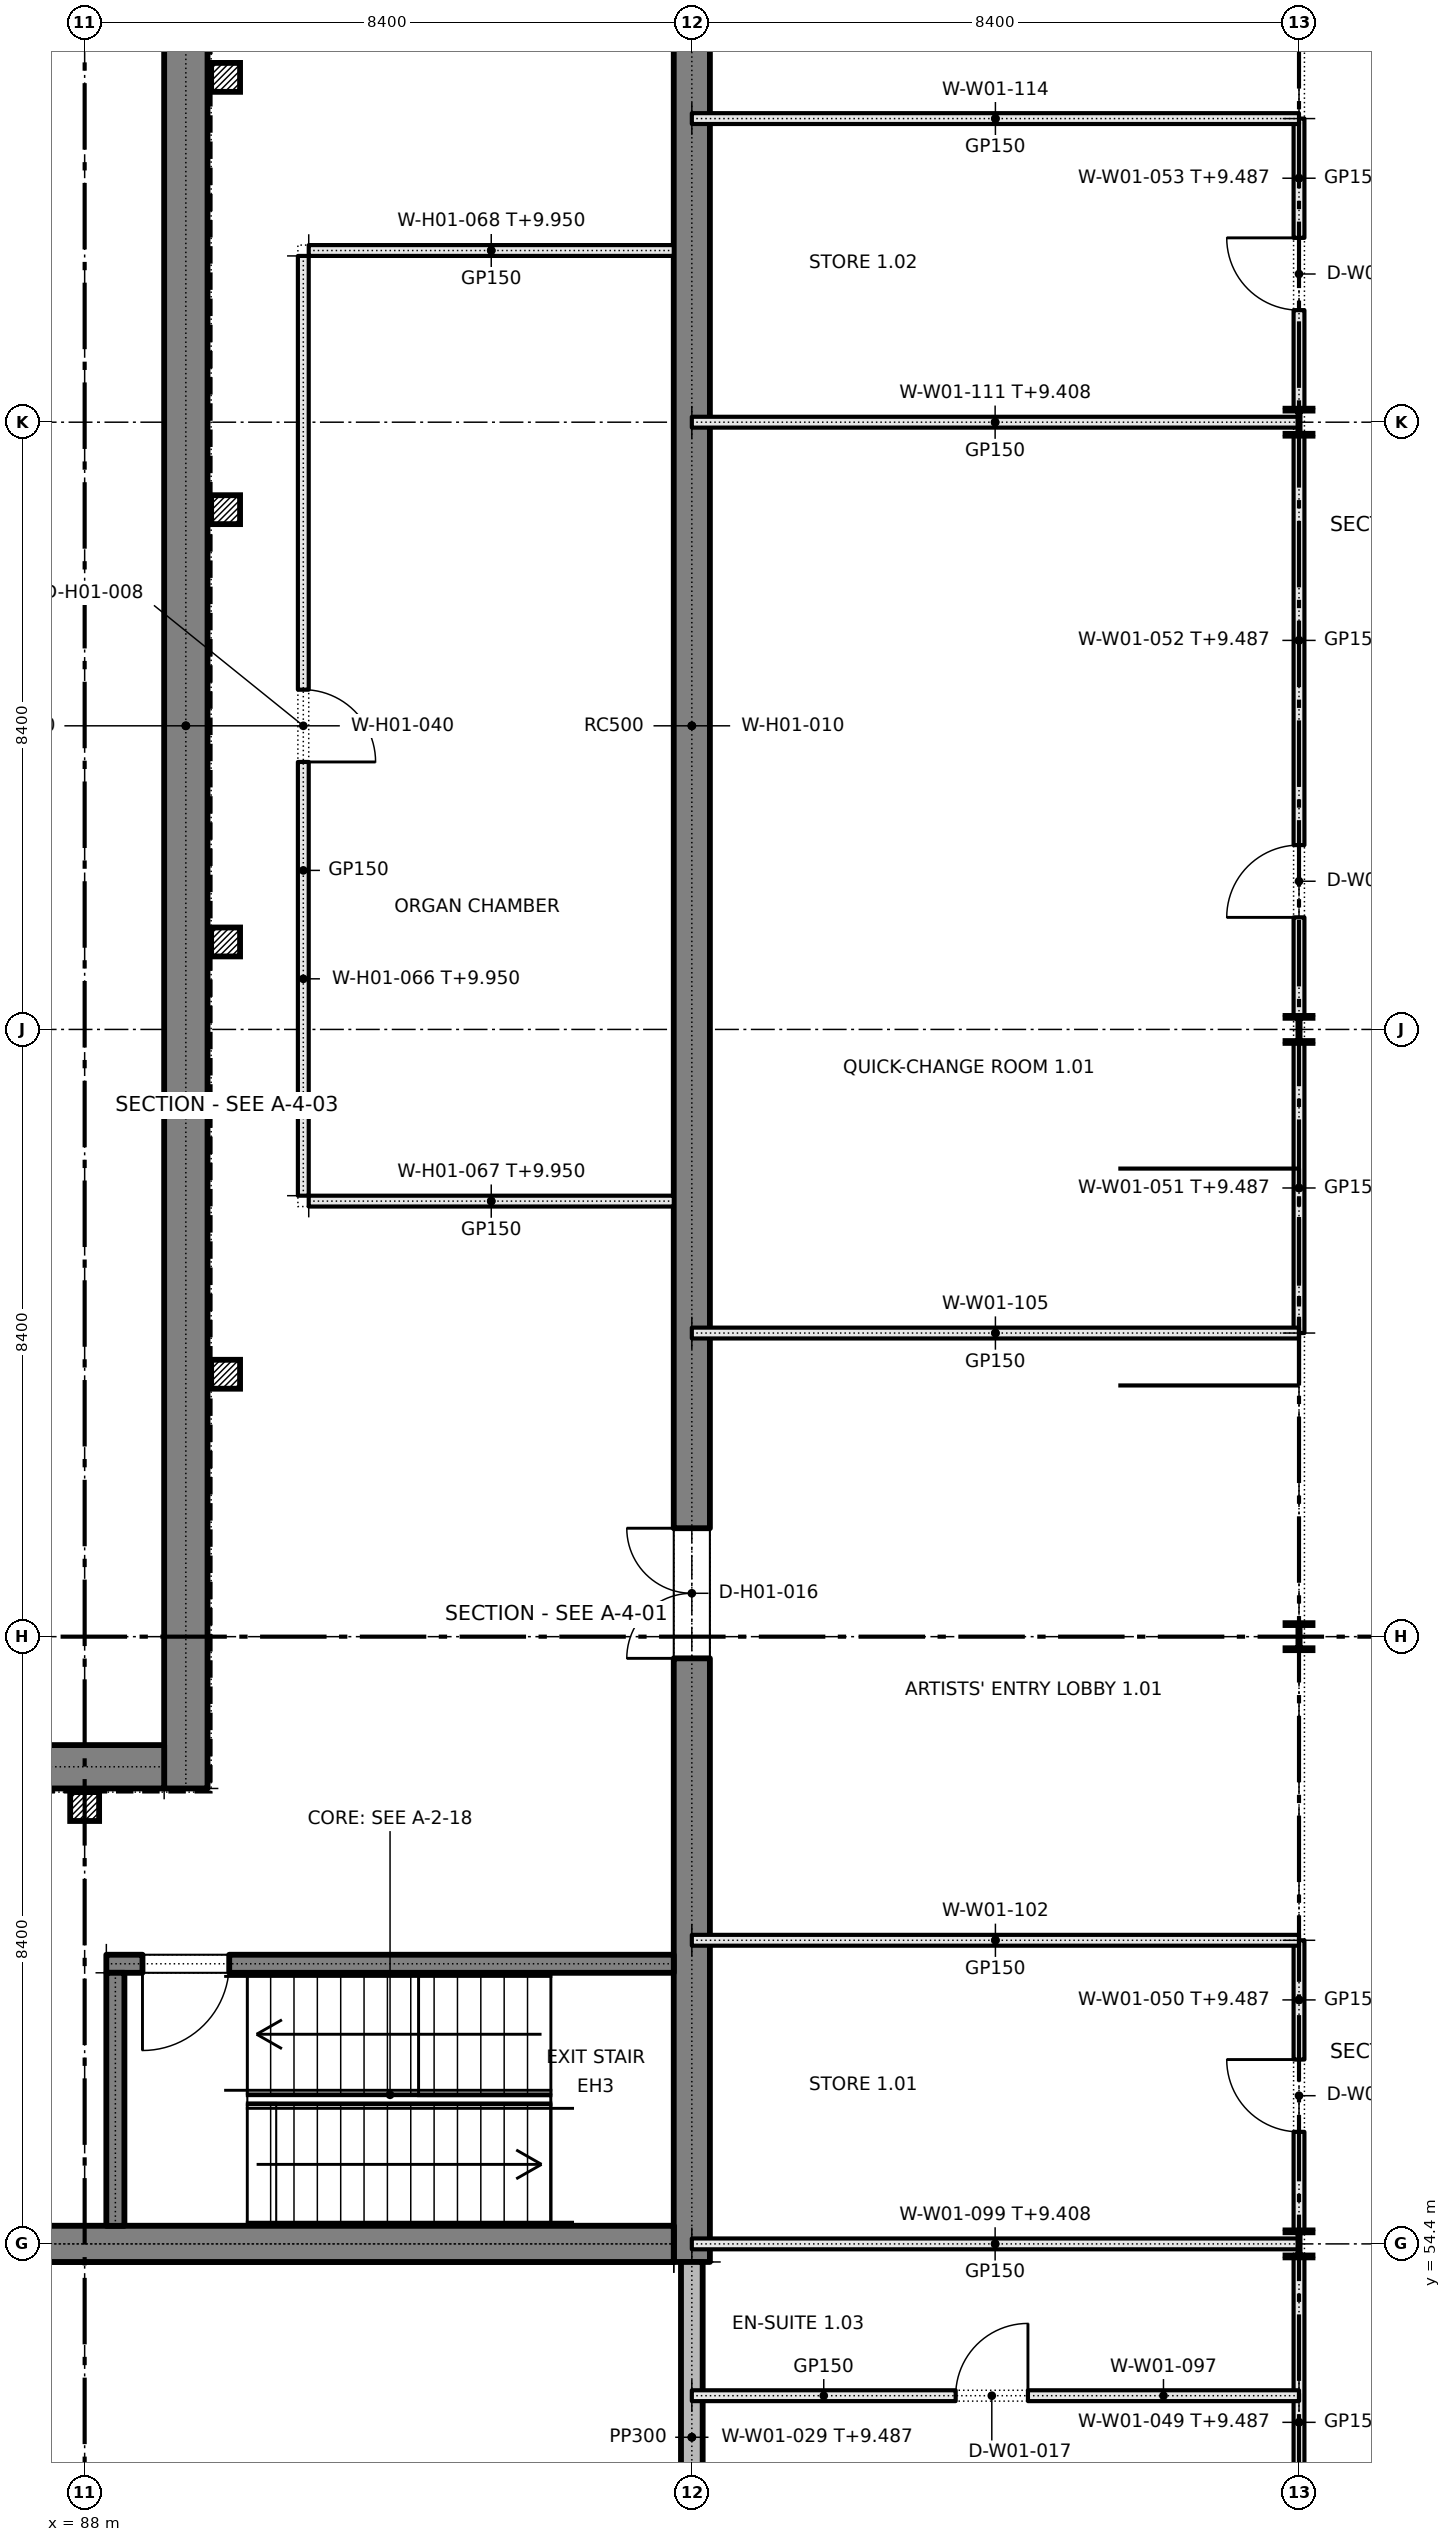
"""IFC4 building model, lengths in metres.
Left out: names, types, materials, properties, quantities, classifications, styles, units other than length and angle.
Written with IfcOpenShell. Run it as: python <this file> out.ifc"""

import sys

from ifc_helpers import new_model, si_unit, direction, frame, frame_2d, origin, origin_2d, place, context, subcontext, project, spatial, rectangle, i_section, extrude, element, fill, save


model = new_model("IFC4")
c1 = context("Model", 3, precision=1e-05, world=origin(), true_north=direction((0.0, 1.0)))
c2 = subcontext(c1, "Body", "Model", "MODEL_VIEW")
j1 = project(units=[si_unit("LENGTHUNIT", "METRE"), si_unit("PLANEANGLEUNIT", "RADIAN")], contexts=[c1])
p1 = place(None, origin())
s1 = spatial("IfcSite", under=j1, at=p1, CompositionType="ELEMENT")
p2 = place(p1, origin())
s2 = spatial("IfcBuilding", under=s1, at=p2, CompositionType="ELEMENT")
p3 = place(p2, frame((0.0, 0.0, 5.4)))
s3 = spatial("IfcBuildingStorey", under=s2, at=p3, CompositionType="ELEMENT", Elevation=5.4)
p4 = place(p3, frame((96.4, 54.15, 0.0), z_axis=(0.0, 0.0, 1.0), x_axis=(0.0, 1.0, 0.0)))
e1 = element("IfcWall", 1, at=p4, inside=s3, PredefinedType="SOLIDWALL", context=c2, shape_type="SweptSolid", body=[
    extrude(rectangle(XDim=42.5, YDim=0.5, at=frame_2d((21.25, 0.0))), origin(), (0.0, 0.0, 1.0), 4.8),
])
p5 = place(p4, frame((8.35, 0.0, 0.0)))
e2 = element("IfcOpeningElement", 2, at=p5, cuts=e1, PredefinedType="OPENING", context=c2, shape_type="SweptSolid", body=[
    extrude(rectangle(XDim=1.8, YDim=2.1, at=frame_2d((0.9, 1.05))), frame((0.0, 0.26, 0.0), z_axis=(0.0, -1.0, 0.0), x_axis=(1.0, 0.0, 0.0)), (0.0, 0.0, 1.0), 0.52),
])
p6 = place(p4, frame((32.35, 0.0, 0.0)))
e3 = element("IfcOpeningElement", 3, at=p6, cuts=e1, PredefinedType="OPENING", context=c2, shape_type="SweptSolid", body=[
    extrude(rectangle(XDim=1.8, YDim=2.1, at=frame_2d((0.9, 1.05))), frame((0.0, 0.26, 0.0), z_axis=(0.0, -1.0, 0.0), x_axis=(1.0, 0.0, 0.0)), (0.0, 0.0, 1.0), 0.52),
])
p7 = place(p3, frame((85.9, 54.4, 0.0), z_axis=(0.0, 0.0, 1.0), x_axis=(1.0, 0.0, 0.0)))
e4 = element("IfcWall", 4, at=p7, inside=s3, PredefinedType="SOLIDWALL", context=c2, shape_type="SweptSolid", body=[
    extrude(rectangle(XDim=10.25, YDim=0.5, at=frame_2d((5.125, 0.0))), origin(), (0.0, 0.0, 1.0), 3.5),
])
p8 = place(p3, frame((29.45, 54.4, 3.5), z_axis=(0.0, 0.0, 1.0), x_axis=(1.0, 0.0, 0.0)))
e5 = element("IfcWall", 5, at=p8, inside=s3, PredefinedType="SOLIDWALL", context=c2, shape_type="SweptSolid", body=[
    extrude(rectangle(XDim=66.7, YDim=0.5, at=frame_2d((33.35, 0.0))), origin(), (0.0, 0.0, 1.0), 1.3),
])
p9 = place(p3, frame((89.4, 60.7, 0.0), z_axis=(0.0, 0.0, 1.0), x_axis=(0.0, 1.0, 0.0)))
e6 = element("IfcWall", 6, at=p9, inside=s3, PredefinedType="SOLIDWALL", context=c2, shape_type="SweptSolid", body=[
    extrude(rectangle(XDim=29.4, YDim=0.6, at=frame_2d((14.7, 0.0))), origin(), (0.0, 0.0, 1.0), 4.8),
])
p10 = place(p3, frame((36.5, 61.0, 0.0), z_axis=(0.0, 0.0, 1.0), x_axis=(1.0, 0.0, 0.0)))
e7 = element("IfcWall", 7, at=p10, inside=s3, PredefinedType="SOLIDWALL", context=c2, shape_type="SweptSolid", body=[
    extrude(rectangle(XDim=52.6, YDim=0.6, at=frame_2d((26.3, 0.0))), origin(), (0.0, 0.0, 1.0), 4.8),
])
p11 = place(p10, frame((9.9, 0.0, 0.0)))
e8 = element("IfcOpeningElement", 8, at=p11, cuts=e7, PredefinedType="OPENING", context=c2, shape_type="SweptSolid", body=[
    extrude(rectangle(XDim=1.2, YDim=2.1, at=frame_2d((0.6, 1.05))), frame((0.0, 0.31, 0.0), z_axis=(0.0, -1.0, 0.0), x_axis=(1.0, 0.0, 0.0)), (0.0, 0.0, 1.0), 0.62),
])
p12 = place(p10, frame((15.4, 0.0, 0.0)))
e9 = element("IfcOpeningElement", 9, at=p12, cuts=e7, PredefinedType="OPENING", context=c2, shape_type="SweptSolid", body=[
    extrude(rectangle(XDim=1.2, YDim=2.1, at=frame_2d((0.6, 1.05))), frame((0.0, 0.31, 0.0), z_axis=(0.0, -1.0, 0.0), x_axis=(1.0, 0.0, 0.0)), (0.0, 0.0, 1.0), 0.62),
])
p13 = place(p10, frame((32.4, 0.0, 0.0)))
e10 = element("IfcOpeningElement", 10, at=p13, cuts=e7, PredefinedType="OPENING", context=c2, shape_type="SweptSolid", body=[
    extrude(rectangle(XDim=1.2, YDim=2.1, at=frame_2d((0.6, 1.05))), frame((0.0, 0.31, 0.0), z_axis=(0.0, -1.0, 0.0), x_axis=(1.0, 0.0, 0.0)), (0.0, 0.0, 1.0), 0.62),
])
p14 = place(p3, frame((88.3, 58.275, 0.0), z_axis=(0.0, 0.0, 1.0), x_axis=(1.0, 0.0, 0.0)))
e11 = element("IfcWall", 11, at=p14, inside=s3, PredefinedType="SOLIDWALL", context=c2, shape_type="SweptSolid", body=[
    extrude(rectangle(XDim=7.85, YDim=0.25, at=frame_2d((3.925, 0.0))), origin(), (0.0, 0.0, 1.0), 4.8),
])
p15 = place(p14, frame((0.5, 0.0, 0.0)))
e12 = element("IfcOpeningElement", 12, at=p15, cuts=e11, PredefinedType="OPENING", context=c2, shape_type="SweptSolid", body=[
    extrude(rectangle(XDim=1.2, YDim=2.1, at=frame_2d((0.6, 1.05))), frame((0.0, 0.135, 0.0), z_axis=(0.0, -1.0, 0.0), x_axis=(1.0, 0.0, 0.0)), (0.0, 0.0, 1.0), 0.27),
])
p16 = place(p3, frame((88.425, 54.65, 0.0), z_axis=(0.0, 0.0, 1.0), x_axis=(0.0, 1.0, 0.0)))
e13 = element("IfcWall", 13, at=p16, inside=s3, PredefinedType="SOLIDWALL", context=c2, shape_type="SweptSolid", body=[
    extrude(rectangle(XDim=3.5, YDim=0.25, at=frame_2d((1.75, 0.0))), origin(), (0.0, 0.0, 1.0), 4.8),
])
for number, where, z_axis, x_axis in (
    (14, (88.0, 60.45, 0.0), (0.0, 0.0, 1.0), (1.0, 0.0, 0.0)),
    (15, (89.95, 66.43, 0.0), (0.0, 0.0, 1.0), (1.0, 0.0, 0.0)),
    (16, (89.95, 72.41, 0.0), (0.0, 0.0, 1.0), (1.0, 0.0, 0.0)),
    (17, (89.95, 78.39, 0.0), (0.0, 0.0, 1.0), (1.0, 0.0, 0.0)),
    (18, (89.95, 84.37, 0.0), (0.0, 0.0, 1.0), (1.0, 0.0, 0.0)),
):
    element("IfcColumn", number, at=place(p3, frame(where, z_axis=z_axis, x_axis=x_axis)), inside=s3, PredefinedType="COLUMN", context=c2, shape_type="SweptSolid", body=[
        extrude(rectangle(XDim=0.4, YDim=0.4, at=origin_2d()), origin(), (0.0, 0.0, 1.0), 4.8),
    ])
for number, where, z_axis, x_axis in (
    (19, (104.8, 54.4, 0.0), (0.0, 0.0, 1.0), (1.0, 0.0, 0.0)),
    (20, (104.8, 62.8, 0.0), (0.0, 0.0, 1.0), (1.0, 0.0, 0.0)),
    (21, (104.8, 71.2, 0.0), (0.0, 0.0, 1.0), (1.0, 0.0, 0.0)),
    (22, (104.8, 79.6, 0.0), (0.0, 0.0, 1.0), (1.0, 0.0, 0.0)),
):
    element("IfcColumn", number, at=place(p3, frame(where, z_axis=z_axis, x_axis=x_axis)), inside=s3, PredefinedType="COLUMN", context=c2, shape_type="SweptSolid", body=[
        extrude(i_section(OverallWidth=0.373, OverallDepth=0.373, WebThickness=0.016, FlangeThickness=0.026, FilletRadius=0.015, at=origin_2d()), origin(), (0.0, 0.0, 1.0), 4.8),
    ])
p17 = place(p3, frame((96.4, 46.187, 0.0), z_axis=(0.0, 0.0, 1.0), x_axis=(0.0, 1.0, 0.0)))
e23 = element("IfcWall", 23, at=p17, inside=s3, PredefinedType="SOLIDWALL", context=c2, shape_type="SweptSolid", body=[
    extrude(rectangle(XDim=7.963, YDim=0.3, at=frame_2d((3.981, 0.0))), origin(), (0.0, 0.0, 1.0), 4.087),
])
p18 = place(p17, frame((0.713, 0.0, 0.95)))
e24 = element("IfcOpeningElement", 24, at=p18, cuts=e23, PredefinedType="OPENING", context=c2, shape_type="SweptSolid", body=[
    extrude(rectangle(XDim=2.4, YDim=1.8, at=frame_2d((1.2, 0.9))), frame((0.0, 0.16, 0.0), z_axis=(0.0, -1.0, 0.0), x_axis=(1.0, 0.0, 0.0)), (0.0, 0.0, 1.0), 0.32),
])
p19 = place(p3, frame((91.025, 68.9, 0.0), z_axis=(0.0, 0.0, 1.0), x_axis=(0.0, 1.0, 0.0)))
e25 = element("IfcWall", 25, at=p19, inside=s3, PredefinedType="PARTITIONING", context=c2, shape_type="SweptSolid", body=[
    extrude(rectangle(XDim=13.0, YDim=0.15, at=frame_2d((6.5, 0.0))), origin(), (0.0, 0.0, 1.0), 4.55),
])
p20 = place(p19, frame((6.0, 0.0, 0.0)))
e26 = element("IfcOpeningElement", 26, at=p20, cuts=e25, PredefinedType="OPENING", context=c2, shape_type="SweptSolid", body=[
    extrude(rectangle(XDim=1.0, YDim=2.1, at=frame_2d((0.5, 1.05))), frame((0.0, 0.085, 0.0), z_axis=(0.0, -1.0, 0.0), x_axis=(1.0, 0.0, 0.0)), (0.0, 0.0, 1.0), 0.17),
])
for number, where, z_axis, x_axis in (
    (27, (91.1, 68.825, 0.0), (0.0, 0.0, 1.0), (1.0, 0.0, 0.0)),
    (28, (91.1, 81.975, 0.0), (0.0, 0.0, 1.0), (1.0, 0.0, 0.0)),
):
    element("IfcWall", number, at=place(p3, frame(where, z_axis=z_axis, x_axis=x_axis)), inside=s3, PredefinedType="PARTITIONING", context=c2, shape_type="SweptSolid", body=[
        extrude(rectangle(XDim=5.05, YDim=0.15, at=frame_2d((2.525, 0.0))), origin(), (0.0, 0.0, 1.0), 4.55),
    ])
p21 = place(p3, frame((104.8, 46.187, 0.0), z_axis=(0.0, 0.0, 1.0), x_axis=(0.0, 1.0, 0.0)))
e29 = element("IfcWall", 29, at=p21, inside=s3, PredefinedType="PARTITIONING", context=c2, shape_type="SweptSolid", body=[
    extrude(rectangle(XDim=8.027, YDim=0.15, at=frame_2d((4.013, 0.0))), origin(), (0.0, 0.0, 1.0), 4.087),
])
p22 = place(p21, frame((2.463, 0.0, 0.0)))
e30 = element("IfcOpeningElement", 30, at=p22, cuts=e29, PredefinedType="OPENING", context=c2, shape_type="SweptSolid", body=[
    extrude(rectangle(XDim=1.0, YDim=2.1, at=frame_2d((0.5, 1.05))), frame((0.0, 0.085, 0.0), z_axis=(0.0, -1.0, 0.0), x_axis=(1.0, 0.0, 0.0)), (0.0, 0.0, 1.0), 0.17),
])
p23 = place(p3, frame((104.8, 54.587, 0.0), z_axis=(0.0, 0.0, 1.0), x_axis=(0.0, 1.0, 0.0)))
e31 = element("IfcWall", 31, at=p23, inside=s3, PredefinedType="PARTITIONING", context=c2, shape_type="SweptSolid", body=[
    extrude(rectangle(XDim=4.013, YDim=0.15, at=frame_2d((2.007, 0.0))), origin(), (0.0, 0.0, 1.0), 4.087),
])
p24 = place(p23, frame((1.363, 0.0, 0.0)))
e32 = element("IfcOpeningElement", 32, at=p24, cuts=e31, PredefinedType="OPENING", context=c2, shape_type="SweptSolid", body=[
    extrude(rectangle(XDim=1.0, YDim=2.1, at=frame_2d((0.5, 1.05))), frame((0.0, 0.085, 0.0), z_axis=(0.0, -1.0, 0.0), x_axis=(1.0, 0.0, 0.0)), (0.0, 0.0, 1.0), 0.17),
])
p25 = place(p3, frame((104.8, 67.0, 0.0), z_axis=(0.0, 0.0, 1.0), x_axis=(0.0, 1.0, 0.0)))
e33 = element("IfcWall", 33, at=p25, inside=s3, PredefinedType="PARTITIONING", context=c2, shape_type="SweptSolid", body=[
    extrude(rectangle(XDim=4.013, YDim=0.15, at=frame_2d((2.007, 0.0))), origin(), (0.0, 0.0, 1.0), 4.087),
])
p26 = place(p3, frame((104.8, 71.387, 0.0), z_axis=(0.0, 0.0, 1.0), x_axis=(0.0, 1.0, 0.0)))
e34 = element("IfcWall", 34, at=p26, inside=s3, PredefinedType="PARTITIONING", context=c2, shape_type="SweptSolid", body=[
    extrude(rectangle(XDim=8.027, YDim=0.15, at=frame_2d((4.013, 0.0))), origin(), (0.0, 0.0, 1.0), 4.087),
])
p27 = place(p26, frame((1.363, 0.0, 0.0)))
e35 = element("IfcOpeningElement", 35, at=p27, cuts=e34, PredefinedType="OPENING", context=c2, shape_type="SweptSolid", body=[
    extrude(rectangle(XDim=1.0, YDim=2.1, at=frame_2d((0.5, 1.05))), frame((0.0, 0.085, 0.0), z_axis=(0.0, -1.0, 0.0), x_axis=(1.0, 0.0, 0.0)), (0.0, 0.0, 1.0), 0.17),
])
p28 = place(p3, frame((104.8, 79.787, 0.0), z_axis=(0.0, 0.0, 1.0), x_axis=(0.0, 1.0, 0.0)))
e36 = element("IfcWall", 36, at=p28, inside=s3, PredefinedType="PARTITIONING", context=c2, shape_type="SweptSolid", body=[
    extrude(rectangle(XDim=4.013, YDim=0.15, at=frame_2d((2.007, 0.0))), origin(), (0.0, 0.0, 1.0), 4.087),
])
p29 = place(p28, frame((1.363, 0.0, 0.0)))
e37 = element("IfcOpeningElement", 37, at=p29, cuts=e36, PredefinedType="OPENING", context=c2, shape_type="SweptSolid", body=[
    extrude(rectangle(XDim=1.0, YDim=2.1, at=frame_2d((0.5, 1.05))), frame((0.0, 0.085, 0.0), z_axis=(0.0, -1.0, 0.0), x_axis=(1.0, 0.0, 0.0)), (0.0, 0.0, 1.0), 0.17),
])
p30 = place(p3, frame((96.4, 52.3, 0.0), z_axis=(0.0, 0.0, 1.0), x_axis=(1.0, 0.0, 0.0)))
e38 = element("IfcWall", 38, at=p30, inside=s3, PredefinedType="PARTITIONING", context=c2, shape_type="SweptSolid", body=[
    extrude(rectangle(XDim=8.4, YDim=0.15, at=frame_2d((4.2, 0.0))), origin(), (0.0, 0.0, 1.0), 4.8),
])
p31 = place(p30, frame((3.65, 0.0, 0.0)))
e39 = element("IfcOpeningElement", 39, at=p31, cuts=e38, PredefinedType="OPENING", context=c2, shape_type="SweptSolid", body=[
    extrude(rectangle(XDim=1.0, YDim=2.1, at=frame_2d((0.5, 1.05))), frame((0.0, 0.085, 0.0), z_axis=(0.0, -1.0, 0.0), x_axis=(1.0, 0.0, 0.0)), (0.0, 0.0, 1.0), 0.17),
])
p32 = place(p3, frame((96.4, 54.4, 0.0), z_axis=(0.0, 0.0, 1.0), x_axis=(1.0, 0.0, 0.0)))
e40 = element("IfcWall", 40, at=p32, inside=s3, PredefinedType="PARTITIONING", context=c2, shape_type="SweptSolid", body=[
    extrude(rectangle(XDim=8.392, YDim=0.15, at=frame_2d((4.196, 0.0))), origin(), (0.0, 0.0, 1.0), 4.008),
])
for number, where, z_axis, x_axis in (
    (41, (96.4, 58.6, 0.0), (0.0, 0.0, 1.0), (1.0, 0.0, 0.0)),
    (42, (96.4, 67.0, 0.0), (0.0, 0.0, 1.0), (1.0, 0.0, 0.0)),
):
    element("IfcWall", number, at=place(p3, frame(where, z_axis=z_axis, x_axis=x_axis)), inside=s3, PredefinedType="PARTITIONING", context=c2, shape_type="SweptSolid", body=[
        extrude(rectangle(XDim=8.4, YDim=0.15, at=frame_2d((4.2, 0.0))), origin(), (0.0, 0.0, 1.0), 4.8),
    ])
p33 = place(p3, frame((96.4, 79.6, 0.0), z_axis=(0.0, 0.0, 1.0), x_axis=(1.0, 0.0, 0.0)))
e43 = element("IfcWall", 43, at=p33, inside=s3, PredefinedType="PARTITIONING", context=c2, shape_type="SweptSolid", body=[
    extrude(rectangle(XDim=8.392, YDim=0.15, at=frame_2d((4.196, 0.0))), origin(), (0.0, 0.0, 1.0), 4.008),
])
p34 = place(p3, frame((96.4, 83.8, 0.0), z_axis=(0.0, 0.0, 1.0), x_axis=(1.0, 0.0, 0.0)))
e44 = element("IfcWall", 44, at=p34, inside=s3, PredefinedType="PARTITIONING", context=c2, shape_type="SweptSolid", body=[
    extrude(rectangle(XDim=8.4, YDim=0.15, at=frame_2d((4.2, 0.0))), origin(), (0.0, 0.0, 1.0), 4.8),
])
p35 = place(p20, frame((1.0, 0.0, 0.0), z_axis=(0.0, 0.0, 1.0), x_axis=(-1.0, 0.0, 0.0)))
e45 = element("IfcDoor", 45, at=p35, inside=s3, OperationType="SINGLE_SWING_RIGHT", PredefinedType="DOOR", context=c2, shape_type="SweptSolid", body=[
    extrude(rectangle(XDim=1.0, YDim=2.1, at=frame_2d((0.5, 1.05))), frame((0.0, 0.025, 0.0), z_axis=(0.0, -1.0, 0.0), x_axis=(1.0, 0.0, 0.0)), (0.0, 0.0, 1.0), 0.05),
])
fill(e26, e45)
p36 = place(p15, frame((1.2, 0.0, 0.0), z_axis=(0.0, 0.0, 1.0), x_axis=(-1.0, 0.0, 0.0)))
e46 = element("IfcDoor", 46, at=p36, inside=s3, OperationType="SINGLE_SWING_RIGHT", PredefinedType="DOOR", context=c2, shape_type="SweptSolid", body=[
    extrude(rectangle(XDim=1.2, YDim=2.1, at=frame_2d((0.6, 1.05))), frame((0.0, 0.025, 0.0), z_axis=(0.0, -1.0, 0.0), x_axis=(1.0, 0.0, 0.0)), (0.0, 0.0, 1.0), 0.05),
])
fill(e12, e46)
p37 = place(p5, origin())
e47 = element("IfcDoor", 47, at=p37, inside=s3, OperationType="DOUBLE_DOOR_SINGLE_SWING", PredefinedType="DOOR", context=c2, shape_type="SweptSolid", body=[
    extrude(rectangle(XDim=1.8, YDim=2.1, at=frame_2d((0.9, 1.05))), frame((0.0, 0.025, 0.0), z_axis=(0.0, -1.0, 0.0), x_axis=(1.0, 0.0, 0.0)), (0.0, 0.0, 1.0), 0.05),
])
fill(e2, e47)
p38 = place(p31, origin())
e48 = element("IfcDoor", 48, at=p38, inside=s3, OperationType="SINGLE_SWING_RIGHT", PredefinedType="DOOR", context=c2, shape_type="SweptSolid", body=[
    extrude(rectangle(XDim=1.0, YDim=2.1, at=frame_2d((0.5, 1.05))), frame((0.0, 0.025, 0.0), z_axis=(0.0, -1.0, 0.0), x_axis=(1.0, 0.0, 0.0)), (0.0, 0.0, 1.0), 0.05),
])
fill(e39, e48)
p39 = place(p24, origin())
e49 = element("IfcDoor", 49, at=p39, inside=s3, OperationType="SINGLE_SWING_RIGHT", PredefinedType="DOOR", context=c2, shape_type="SweptSolid", body=[
    extrude(rectangle(XDim=1.0, YDim=2.1, at=frame_2d((0.5, 1.05))), frame((0.0, 0.025, 0.0), z_axis=(0.0, -1.0, 0.0), x_axis=(1.0, 0.0, 0.0)), (0.0, 0.0, 1.0), 0.05),
])
fill(e32, e49)
p40 = place(p27, origin())
e50 = element("IfcDoor", 50, at=p40, inside=s3, OperationType="SINGLE_SWING_LEFT", PredefinedType="DOOR", context=c2, shape_type="SweptSolid", body=[
    extrude(rectangle(XDim=1.0, YDim=2.1, at=frame_2d((0.5, 1.05))), frame((0.0, 0.025, 0.0), z_axis=(0.0, -1.0, 0.0), x_axis=(1.0, 0.0, 0.0)), (0.0, 0.0, 1.0), 0.05),
])
fill(e35, e50)
p41 = place(p29, origin())
e51 = element("IfcDoor", 51, at=p41, inside=s3, OperationType="SINGLE_SWING_RIGHT", PredefinedType="DOOR", context=c2, shape_type="SweptSolid", body=[
    extrude(rectangle(XDim=1.0, YDim=2.1, at=frame_2d((0.5, 1.05))), frame((0.0, 0.025, 0.0), z_axis=(0.0, -1.0, 0.0), x_axis=(1.0, 0.0, 0.0)), (0.0, 0.0, 1.0), 0.05),
])
fill(e37, e51)
save(model, sys.argv[1])
